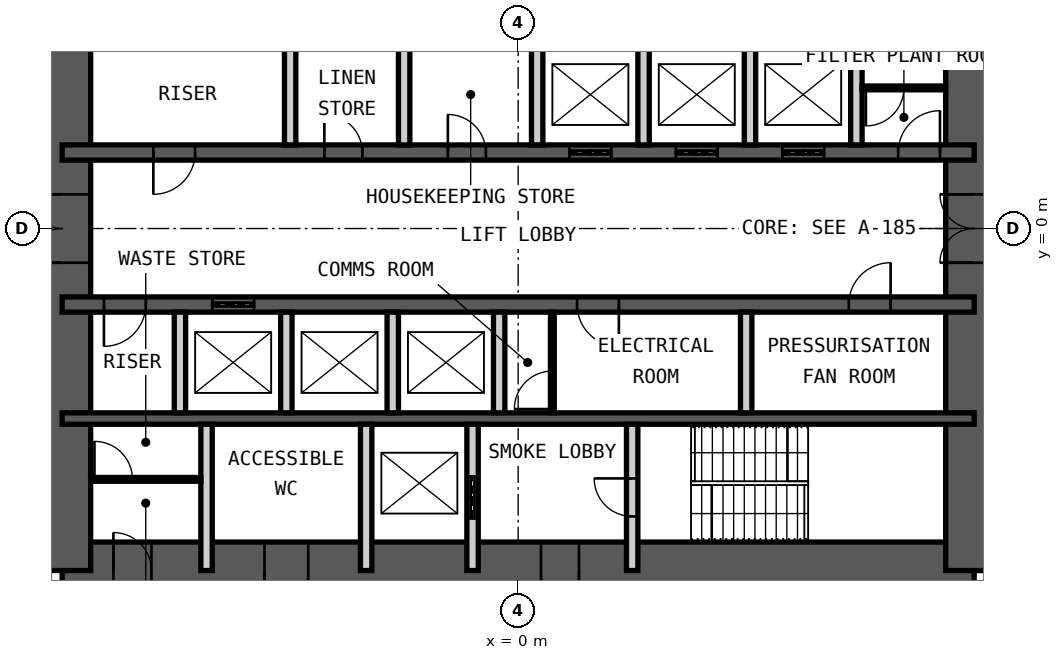
"""IFC4 building model, lengths in metres.
Left out: names, types, materials, properties, quantities, classifications, styles, units other than length and angle.
Written with IfcOpenShell. Run it as: python <this file> out.ifc"""

import sys

from ifc_helpers import new_model, si_unit, direction, frame, frame_2d, origin, place, context, subcontext, project, spatial, rectangle, extrude, element, fill, save


model = new_model("IFC4")
c1 = context("Model", 3, precision=1e-05, world=origin(), true_north=direction((0.0, 1.0)))
c2 = subcontext(c1, "Body", "Model", "MODEL_VIEW")
j1 = project(units=[si_unit("LENGTHUNIT", "METRE"), si_unit("PLANEANGLEUNIT", "RADIAN")], contexts=[c1])
p1 = place(None, origin())
s1 = spatial("IfcSite", under=j1, at=p1, CompositionType="ELEMENT")
p2 = place(p1, origin())
s2 = spatial("IfcBuilding", under=s1, at=p2, CompositionType="ELEMENT")
p3 = place(p2, frame((0.0, 0.0, 103.0)))
s3 = spatial("IfcBuildingStorey", under=s2, at=p3, CompositionType="ELEMENT", Elevation=103.0)
p4 = place(p3, frame((-12.0, -9.0, 0.0), z_axis=(0.0, 0.0, 1.0), x_axis=(1.0, 0.0, 0.0)))
e1 = element("IfcWall", 1, at=p4, inside=s3, PredefinedType="SHEAR", context=c2, shape_type="SweptSolid", body=[
    extrude(rectangle(XDim=24.0, YDim=1.5, at=frame_2d((12.0, 0.0))), origin(), (0.0, 0.0, 1.0), 4.2),
])
p5 = place(p4, frame((1.35, 0.0, 0.0)))
e2 = element("IfcOpeningElement", 2, at=p5, cuts=e1, PredefinedType="OPENING", context=c2, shape_type="SweptSolid", body=[
    extrude(rectangle(XDim=1.0, YDim=2.1, at=frame_2d((0.5, 1.05))), frame((0.0, 0.76, 0.0), z_axis=(0.0, -1.0, 0.0), x_axis=(1.0, 0.0, 0.0)), (0.0, 0.0, 1.0), 1.52),
])
p6 = place(p4, frame((5.325, 0.0, 0.0)))
e3 = element("IfcOpeningElement", 3, at=p6, cuts=e1, PredefinedType="OPENING", context=c2, shape_type="SweptSolid", body=[
    extrude(rectangle(XDim=1.15, YDim=2.1, at=frame_2d((0.575, 1.05))), frame((0.0, 0.76, 0.0), z_axis=(0.0, -1.0, 0.0), x_axis=(1.0, 0.0, 0.0)), (0.0, 0.0, 1.0), 1.52),
])
p7 = place(p4, frame((12.6, 0.0, 0.0)))
e4 = element("IfcOpeningElement", 4, at=p7, cuts=e1, PredefinedType="OPENING", context=c2, shape_type="SweptSolid", body=[
    extrude(rectangle(XDim=1.0, YDim=2.1, at=frame_2d((0.5, 1.05))), frame((0.0, 0.76, 0.0), z_axis=(0.0, -1.0, 0.0), x_axis=(1.0, 0.0, 0.0)), (0.0, 0.0, 1.0), 1.52),
])
p8 = place(p3, frame((12.0, -9.0, 0.0), z_axis=(0.0, 0.0, 1.0), x_axis=(0.0, 1.0, 0.0)))
e5 = element("IfcWall", 5, at=p8, inside=s3, PredefinedType="SHEAR", context=c2, shape_type="SweptSolid", body=[
    extrude(rectangle(XDim=18.0, YDim=1.5, at=frame_2d((9.0, 0.0))), origin(), (0.0, 0.0, 1.0), 4.2),
])
p9 = place(p8, frame((8.1, 0.0, 0.0)))
e6 = element("IfcOpeningElement", 6, at=p9, cuts=e5, PredefinedType="OPENING", context=c2, shape_type="SweptSolid", body=[
    extrude(rectangle(XDim=1.8, YDim=2.1, at=frame_2d((0.9, 1.05))), frame((0.0, 0.76, 0.0), z_axis=(0.0, -1.0, 0.0), x_axis=(1.0, 0.0, 0.0)), (0.0, 0.0, 1.0), 1.52),
])
p10 = place(p3, frame((-12.0, -9.0, 0.0), z_axis=(0.0, 0.0, 1.0), x_axis=(0.0, 1.0, 0.0)))
e7 = element("IfcWall", 7, at=p10, inside=s3, PredefinedType="SHEAR", context=c2, shape_type="SweptSolid", body=[
    extrude(rectangle(XDim=18.0, YDim=1.5, at=frame_2d((9.0, 0.0))), origin(), (0.0, 0.0, 1.0), 4.2),
])
p11 = place(p10, frame((8.1, 0.0, 0.0)))
e8 = element("IfcOpeningElement", 8, at=p11, cuts=e7, PredefinedType="OPENING", context=c2, shape_type="SweptSolid", body=[
    extrude(rectangle(XDim=1.8, YDim=2.1, at=frame_2d((0.9, 1.05))), frame((0.0, 0.76, 0.0), z_axis=(0.0, -1.0, 0.0), x_axis=(1.0, 0.0, 0.0)), (0.0, 0.0, 1.0), 1.52),
])
p12 = place(p3, frame((-12.0, 2.0, 0.0), z_axis=(0.0, 0.0, 1.0), x_axis=(1.0, 0.0, 0.0)))
e9 = element("IfcWall", 9, at=p12, inside=s3, PredefinedType="SHEAR", context=c2, shape_type="SweptSolid", body=[
    extrude(rectangle(XDim=24.0, YDim=0.4, at=frame_2d((12.0, 0.0))), origin(), (0.0, 0.0, 1.0), 4.2),
])
p13 = place(p12, frame((2.4, 0.0, 0.0)))
e10 = element("IfcOpeningElement", 10, at=p13, cuts=e9, PredefinedType="OPENING", context=c2, shape_type="SweptSolid", body=[
    extrude(rectangle(XDim=1.1, YDim=2.1, at=frame_2d((0.55, 1.05))), frame((0.0, 0.21, 0.0), z_axis=(0.0, -1.0, 0.0), x_axis=(1.0, 0.0, 0.0)), (0.0, 0.0, 1.0), 0.42),
])
p14 = place(p12, frame((22.0, 0.0, 0.0)))
e11 = element("IfcOpeningElement", 11, at=p14, cuts=e9, PredefinedType="OPENING", context=c2, shape_type="SweptSolid", body=[
    extrude(rectangle(XDim=1.1, YDim=2.1, at=frame_2d((0.55, 1.05))), frame((0.0, 0.21, 0.0), z_axis=(0.0, -1.0, 0.0), x_axis=(1.0, 0.0, 0.0)), (0.0, 0.0, 1.0), 0.42),
])
p15 = place(p12, frame((10.15, 0.0, 0.0)))
e12 = element("IfcOpeningElement", 12, at=p15, cuts=e9, PredefinedType="OPENING", context=c2, shape_type="SweptSolid", body=[
    extrude(rectangle(XDim=1.0, YDim=2.1, at=frame_2d((0.5, 1.05))), frame((0.0, 0.21, 0.0), z_axis=(0.0, -1.0, 0.0), x_axis=(1.0, 0.0, 0.0)), (0.0, 0.0, 1.0), 0.42),
])
p16 = place(p12, frame((6.9, 0.0, 0.0)))
e13 = element("IfcOpeningElement", 13, at=p16, cuts=e9, PredefinedType="OPENING", context=c2, shape_type="SweptSolid", body=[
    extrude(rectangle(XDim=1.0, YDim=2.1, at=frame_2d((0.5, 1.05))), frame((0.0, 0.21, 0.0), z_axis=(0.0, -1.0, 0.0), x_axis=(1.0, 0.0, 0.0)), (0.0, 0.0, 1.0), 0.42),
])
p17 = place(p12, frame((13.35, 0.0, 0.0)))
e14 = element("IfcOpeningElement", 14, at=p17, cuts=e9, PredefinedType="OPENING", context=c2, shape_type="SweptSolid", body=[
    extrude(rectangle(XDim=1.1, YDim=2.4, at=frame_2d((0.55, 1.2))), frame((0.0, 0.21, 0.0), z_axis=(0.0, -1.0, 0.0), x_axis=(1.0, 0.0, 0.0)), (0.0, 0.0, 1.0), 0.42),
])
p18 = place(p12, frame((16.15, 0.0, 0.0)))
e15 = element("IfcOpeningElement", 15, at=p18, cuts=e9, PredefinedType="OPENING", context=c2, shape_type="SweptSolid", body=[
    extrude(rectangle(XDim=1.1, YDim=2.4, at=frame_2d((0.55, 1.2))), frame((0.0, 0.21, 0.0), z_axis=(0.0, -1.0, 0.0), x_axis=(1.0, 0.0, 0.0)), (0.0, 0.0, 1.0), 0.42),
])
p19 = place(p12, frame((18.95, 0.0, 0.0)))
e16 = element("IfcOpeningElement", 16, at=p19, cuts=e9, PredefinedType="OPENING", context=c2, shape_type="SweptSolid", body=[
    extrude(rectangle(XDim=1.1, YDim=2.4, at=frame_2d((0.55, 1.2))), frame((0.0, 0.21, 0.0), z_axis=(0.0, -1.0, 0.0), x_axis=(1.0, 0.0, 0.0)), (0.0, 0.0, 1.0), 0.42),
])
p20 = place(p3, frame((-12.0, -2.0, 0.0), z_axis=(0.0, 0.0, 1.0), x_axis=(1.0, 0.0, 0.0)))
e17 = element("IfcWall", 17, at=p20, inside=s3, PredefinedType="SHEAR", context=c2, shape_type="SweptSolid", body=[
    extrude(rectangle(XDim=24.0, YDim=0.4, at=frame_2d((12.0, 0.0))), origin(), (0.0, 0.0, 1.0), 4.2),
])
p21 = place(p20, frame((1.1, 0.0, 0.0)))
e18 = element("IfcOpeningElement", 18, at=p21, cuts=e17, PredefinedType="OPENING", context=c2, shape_type="SweptSolid", body=[
    extrude(rectangle(XDim=1.1, YDim=2.1, at=frame_2d((0.55, 1.05))), frame((0.0, 0.21, 0.0), z_axis=(0.0, -1.0, 0.0), x_axis=(1.0, 0.0, 0.0)), (0.0, 0.0, 1.0), 0.42),
])
p22 = place(p20, frame((13.55, 0.0, 0.0)))
e19 = element("IfcOpeningElement", 19, at=p22, cuts=e17, PredefinedType="OPENING", context=c2, shape_type="SweptSolid", body=[
    extrude(rectangle(XDim=1.1, YDim=2.1, at=frame_2d((0.55, 1.05))), frame((0.0, 0.21, 0.0), z_axis=(0.0, -1.0, 0.0), x_axis=(1.0, 0.0, 0.0)), (0.0, 0.0, 1.0), 0.42),
])
p23 = place(p20, frame((20.7, 0.0, 0.0)))
e20 = element("IfcOpeningElement", 20, at=p23, cuts=e17, PredefinedType="OPENING", context=c2, shape_type="SweptSolid", body=[
    extrude(rectangle(XDim=1.1, YDim=2.1, at=frame_2d((0.55, 1.05))), frame((0.0, 0.21, 0.0), z_axis=(0.0, -1.0, 0.0), x_axis=(1.0, 0.0, 0.0)), (0.0, 0.0, 1.0), 0.42),
])
p24 = place(p20, frame((3.95, 0.0, 0.0)))
e21 = element("IfcOpeningElement", 21, at=p24, cuts=e17, PredefinedType="OPENING", context=c2, shape_type="SweptSolid", body=[
    extrude(rectangle(XDim=1.1, YDim=2.4, at=frame_2d((0.55, 1.2))), frame((0.0, 0.21, 0.0), z_axis=(0.0, -1.0, 0.0), x_axis=(1.0, 0.0, 0.0)), (0.0, 0.0, 1.0), 0.42),
])
p25 = place(p3, frame((-12.0, -5.0, 0.0), z_axis=(0.0, 0.0, 1.0), x_axis=(1.0, 0.0, 0.0)))
e22 = element("IfcWall", 22, at=p25, inside=s3, PredefinedType="SHEAR", context=c2, shape_type="SweptSolid", body=[
    extrude(rectangle(XDim=24.0, YDim=0.3, at=frame_2d((12.0, 0.0))), origin(), (0.0, 0.0, 1.0), 4.2),
])
for number, where, z_axis, x_axis in (
    (23, (-6.0, 2.2, 0.0), (0.0, 0.0, 1.0), (0.0, 1.0, 0.0)),
    (24, (-3.0, 2.2, 0.0), (0.0, 0.0, 1.0), (0.0, 1.0, 0.0)),
    (25, (0.5, 2.2, 0.0), (0.0, 0.0, 1.0), (0.0, 1.0, 0.0)),
    (26, (3.3, 2.2, 0.0), (0.0, 0.0, 1.0), (0.0, 1.0, 0.0)),
    (27, (6.1, 2.2, 0.0), (0.0, 0.0, 1.0), (0.0, 1.0, 0.0)),
    (28, (8.9, 2.2, 0.0), (0.0, 0.0, 1.0), (0.0, 1.0, 0.0)),
    (29, (-8.9, -4.85, 0.0), (0.0, 0.0, 1.0), (0.0, 1.0, 0.0)),
    (30, (-6.1, -4.85, 0.0), (0.0, 0.0, 1.0), (0.0, 1.0, 0.0)),
    (31, (-3.3, -4.85, 0.0), (0.0, 0.0, 1.0), (0.0, 1.0, 0.0)),
    (32, (-0.5, -4.85, 0.0), (0.0, 0.0, 1.0), (0.0, 1.0, 0.0)),
    (33, (6.0, -4.85, 0.0), (0.0, 0.0, 1.0), (0.0, 1.0, 0.0)),
):
    element("IfcWall", number, at=place(p3, frame(where, z_axis=z_axis, x_axis=x_axis)), inside=s3, PredefinedType="PARTITIONING", context=c2, shape_type="SweptSolid", body=[
        extrude(rectangle(XDim=2.65, YDim=0.3, at=frame_2d((1.325, 0.0))), origin(), (0.0, 0.0, 1.0), 3.98),
    ])
for number, where, z_axis, x_axis in (
    (34, (-8.2, -9.0, 0.0), (0.0, 0.0, 1.0), (0.0, 1.0, 0.0)),
    (35, (-4.0, -9.0, 0.0), (0.0, 0.0, 1.0), (0.0, 1.0, 0.0)),
):
    element("IfcWall", number, at=place(p3, frame(where, z_axis=z_axis, x_axis=x_axis)), inside=s3, PredefinedType="PARTITIONING", context=c2, shape_type="SweptSolid", body=[
        extrude(rectangle(XDim=3.85, YDim=0.3, at=frame_2d((1.925, 0.0))), origin(), (0.0, 0.0, 1.0), 3.98),
    ])
p26 = place(p3, frame((-1.2, -9.0, 0.0), z_axis=(0.0, 0.0, 1.0), x_axis=(0.0, 1.0, 0.0)))
e36 = element("IfcWall", 36, at=p26, inside=s3, PredefinedType="PARTITIONING", context=c2, shape_type="SweptSolid", body=[
    extrude(rectangle(XDim=3.85, YDim=0.3, at=frame_2d((1.925, 0.0))), origin(), (0.0, 0.0, 1.0), 3.98),
])
p27 = place(p26, frame((1.375, 0.0, 0.0)))
e37 = element("IfcOpeningElement", 37, at=p27, cuts=e36, PredefinedType="OPENING", context=c2, shape_type="SweptSolid", body=[
    extrude(rectangle(XDim=1.1, YDim=2.4, at=frame_2d((0.55, 1.2))), frame((0.0, 0.16, 0.0), z_axis=(0.0, -1.0, 0.0), x_axis=(1.0, 0.0, 0.0)), (0.0, 0.0, 1.0), 0.32),
])
p28 = place(p3, frame((3.0, -9.0, 0.0), z_axis=(0.0, 0.0, 1.0), x_axis=(0.0, 1.0, 0.0)))
e38 = element("IfcWall", 38, at=p28, inside=s3, PredefinedType="PARTITIONING", context=c2, shape_type="SweptSolid", body=[
    extrude(rectangle(XDim=3.85, YDim=0.3, at=frame_2d((1.925, 0.0))), origin(), (0.0, 0.0, 1.0), 3.98),
])
p29 = place(p28, frame((1.425, 0.0, 0.0)))
e39 = element("IfcOpeningElement", 39, at=p29, cuts=e38, PredefinedType="OPENING", context=c2, shape_type="SweptSolid", body=[
    extrude(rectangle(XDim=1.0, YDim=2.1, at=frame_2d((0.5, 1.05))), frame((0.0, 0.16, 0.0), z_axis=(0.0, -1.0, 0.0), x_axis=(1.0, 0.0, 0.0)), (0.0, 0.0, 1.0), 0.32),
])
p30 = place(p3, frame((0.9, -4.85, 0.0), z_axis=(0.0, 0.0, 1.0), x_axis=(0.0, 1.0, 0.0)))
e40 = element("IfcWall", 40, at=p30, inside=s3, PredefinedType="PARTITIONING", context=c2, shape_type="SweptSolid", body=[
    extrude(rectangle(XDim=2.65, YDim=0.1, at=frame_2d((1.325, 0.0))), origin(), (0.0, 0.0, 1.0), 3.98),
])
p31 = place(p30, frame((0.1, 0.0, 0.0)))
e41 = element("IfcOpeningElement", 41, at=p31, cuts=e40, PredefinedType="OPENING", context=c2, shape_type="SweptSolid", body=[
    extrude(rectangle(XDim=1.0, YDim=2.4, at=frame_2d((0.5, 1.2))), frame((0.0, 0.06, 0.0), z_axis=(0.0, -1.0, 0.0), x_axis=(1.0, 0.0, 0.0)), (0.0, 0.0, 1.0), 0.12),
])
p32 = place(p3, frame((-11.25, -6.6, 0.0), z_axis=(0.0, 0.0, 1.0), x_axis=(1.0, 0.0, 0.0)))
e42 = element("IfcWall", 42, at=p32, inside=s3, PredefinedType="PARTITIONING", context=c2, shape_type="SweptSolid", body=[
    extrude(rectangle(XDim=2.9, YDim=0.1, at=frame_2d((1.45, 0.0))), origin(), (0.0, 0.0, 1.0), 3.98),
])
p33 = place(p32, frame((0.1, 0.0, 0.0)))
e43 = element("IfcOpeningElement", 43, at=p33, cuts=e42, PredefinedType="OPENING", context=c2, shape_type="SweptSolid", body=[
    extrude(rectangle(XDim=1.0, YDim=2.4, at=frame_2d((0.5, 1.2))), frame((0.0, 0.06, 0.0), z_axis=(0.0, -1.0, 0.0), x_axis=(1.0, 0.0, 0.0)), (0.0, 0.0, 1.0), 0.12),
])
p34 = place(p3, frame((9.05, 3.7, 0.0), z_axis=(0.0, 0.0, 1.0), x_axis=(1.0, 0.0, 0.0)))
e44 = element("IfcWall", 44, at=p34, inside=s3, PredefinedType="PARTITIONING", context=c2, shape_type="SweptSolid", body=[
    extrude(rectangle(XDim=2.2, YDim=0.1, at=frame_2d((1.1, 0.0))), origin(), (0.0, 0.0, 1.0), 3.98),
])
p35 = place(p34, frame((0.1, 0.0, 0.0)))
e45 = element("IfcOpeningElement", 45, at=p35, cuts=e44, PredefinedType="OPENING", context=c2, shape_type="SweptSolid", body=[
    extrude(rectangle(XDim=1.0, YDim=2.4, at=frame_2d((0.5, 1.2))), frame((0.0, 0.06, 0.0), z_axis=(0.0, -1.0, 0.0), x_axis=(1.0, 0.0, 0.0)), (0.0, 0.0, 1.0), 0.12),
])
p36 = place(p5, origin())
e46 = element("IfcDoor", 46, at=p36, inside=s3, OperationType="SINGLE_SWING_RIGHT", PredefinedType="DOOR", context=c2, shape_type="SweptSolid", body=[
    extrude(rectangle(XDim=1.0, YDim=2.1, at=frame_2d((0.5, 1.05))), frame((0.0, 0.025, 0.0), z_axis=(0.0, -1.0, 0.0), x_axis=(1.0, 0.0, 0.0)), (0.0, 0.0, 1.0), 0.05),
])
fill(e2, e46)
p37 = place(p6, origin())
e47 = element("IfcDoor", 47, at=p37, inside=s3, OperationType="SINGLE_SWING_LEFT", PredefinedType="DOOR", context=c2, shape_type="SweptSolid", body=[
    extrude(rectangle(XDim=1.15, YDim=2.1, at=frame_2d((0.575, 1.05))), frame((0.0, 0.025, 0.0), z_axis=(0.0, -1.0, 0.0), x_axis=(1.0, 0.0, 0.0)), (0.0, 0.0, 1.0), 0.05),
])
fill(e3, e47)
p38 = place(p7, origin())
e48 = element("IfcDoor", 48, at=p38, inside=s3, OperationType="SINGLE_SWING_RIGHT", PredefinedType="DOOR", context=c2, shape_type="SweptSolid", body=[
    extrude(rectangle(XDim=1.0, YDim=2.1, at=frame_2d((0.5, 1.05))), frame((0.0, 0.025, 0.0), z_axis=(0.0, -1.0, 0.0), x_axis=(1.0, 0.0, 0.0)), (0.0, 0.0, 1.0), 0.05),
])
fill(e4, e48)
p39 = place(p29, origin())
e49 = element("IfcDoor", 49, at=p39, inside=s3, OperationType="SINGLE_SWING_LEFT", PredefinedType="DOOR", context=c2, shape_type="SweptSolid", body=[
    extrude(rectangle(XDim=1.0, YDim=2.1, at=frame_2d((0.5, 1.05))), frame((0.0, 0.025, 0.0), z_axis=(0.0, -1.0, 0.0), x_axis=(1.0, 0.0, 0.0)), (0.0, 0.0, 1.0), 0.05),
])
fill(e39, e49)
p40 = place(p13, origin())
e50 = element("IfcDoor", 50, at=p40, inside=s3, OperationType="SINGLE_SWING_LEFT", PredefinedType="DOOR", context=c2, shape_type="SweptSolid", body=[
    extrude(rectangle(XDim=1.1, YDim=2.1, at=frame_2d((0.55, 1.05))), frame((0.0, 0.025, 0.0), z_axis=(0.0, -1.0, 0.0), x_axis=(1.0, 0.0, 0.0)), (0.0, 0.0, 1.0), 0.05),
])
fill(e10, e50)
p41 = place(p21, origin())
e51 = element("IfcDoor", 51, at=p41, inside=s3, OperationType="SINGLE_SWING_LEFT", PredefinedType="DOOR", context=c2, shape_type="SweptSolid", body=[
    extrude(rectangle(XDim=1.1, YDim=2.1, at=frame_2d((0.55, 1.05))), frame((0.0, 0.025, 0.0), z_axis=(0.0, -1.0, 0.0), x_axis=(1.0, 0.0, 0.0)), (0.0, 0.0, 1.0), 0.05),
])
fill(e18, e51)
p42 = place(p14, origin())
e52 = element("IfcDoor", 52, at=p42, inside=s3, OperationType="SINGLE_SWING_LEFT", PredefinedType="DOOR", context=c2, shape_type="SweptSolid", body=[
    extrude(rectangle(XDim=1.1, YDim=2.1, at=frame_2d((0.55, 1.05))), frame((0.0, 0.025, 0.0), z_axis=(0.0, -1.0, 0.0), x_axis=(1.0, 0.0, 0.0)), (0.0, 0.0, 1.0), 0.05),
])
fill(e11, e52)
p43 = place(p15, origin())
e53 = element("IfcDoor", 53, at=p43, inside=s3, OperationType="SINGLE_SWING_RIGHT", PredefinedType="DOOR", context=c2, shape_type="SweptSolid", body=[
    extrude(rectangle(XDim=1.0, YDim=2.1, at=frame_2d((0.5, 1.05))), frame((0.0, 0.025, 0.0), z_axis=(0.0, -1.0, 0.0), x_axis=(1.0, 0.0, 0.0)), (0.0, 0.0, 1.0), 0.05),
])
fill(e12, e53)
p44 = place(p22, origin())
e54 = element("IfcDoor", 54, at=p44, inside=s3, OperationType="SINGLE_SWING_RIGHT", PredefinedType="DOOR", context=c2, shape_type="SweptSolid", body=[
    extrude(rectangle(XDim=1.1, YDim=2.1, at=frame_2d((0.55, 1.05))), frame((0.0, 0.025, 0.0), z_axis=(0.0, -1.0, 0.0), x_axis=(1.0, 0.0, 0.0)), (0.0, 0.0, 1.0), 0.05),
])
fill(e19, e54)
p45 = place(p23, origin())
e55 = element("IfcDoor", 55, at=p45, inside=s3, OperationType="SINGLE_SWING_LEFT", PredefinedType="DOOR", context=c2, shape_type="SweptSolid", body=[
    extrude(rectangle(XDim=1.1, YDim=2.1, at=frame_2d((0.55, 1.05))), frame((0.0, 0.025, 0.0), z_axis=(0.0, -1.0, 0.0), x_axis=(1.0, 0.0, 0.0)), (0.0, 0.0, 1.0), 0.05),
])
fill(e20, e55)
p46 = place(p9, origin())
e56 = element("IfcDoor", 56, at=p46, inside=s3, OperationType="DOUBLE_DOOR_DOUBLE_SWING", PredefinedType="DOOR", context=c2, shape_type="SweptSolid", body=[
    extrude(rectangle(XDim=1.8, YDim=2.1, at=frame_2d((0.9, 1.05))), frame((0.0, 0.025, 0.0), z_axis=(0.0, -1.0, 0.0), x_axis=(1.0, 0.0, 0.0)), (0.0, 0.0, 1.0), 0.05),
])
fill(e6, e56)
p47 = place(p11, origin())
e57 = element("IfcDoor", 57, at=p47, inside=s3, OperationType="DOUBLE_DOOR_DOUBLE_SWING", PredefinedType="DOOR", context=c2, shape_type="SweptSolid", body=[
    extrude(rectangle(XDim=1.8, YDim=2.1, at=frame_2d((0.9, 1.05))), frame((0.0, 0.025, 0.0), z_axis=(0.0, -1.0, 0.0), x_axis=(1.0, 0.0, 0.0)), (0.0, 0.0, 1.0), 0.05),
])
fill(e8, e57)
p48 = place(p27, origin())
e58 = element("IfcDoor", 58, at=p48, inside=s3, OperationType="DOUBLE_DOOR_SLIDING", PredefinedType="DOOR", context=c2, shape_type="SweptSolid", body=[
    extrude(rectangle(XDim=1.1, YDim=2.4, at=frame_2d((0.55, 1.2))), frame((0.0, 0.025, 0.0), z_axis=(0.0, -1.0, 0.0), x_axis=(1.0, 0.0, 0.0)), (0.0, 0.0, 1.0), 0.05),
])
fill(e37, e58)
p49 = place(p16, origin())
e59 = element("IfcDoor", 59, at=p49, inside=s3, OperationType="SINGLE_SWING_RIGHT", PredefinedType="DOOR", context=c2, shape_type="SweptSolid", body=[
    extrude(rectangle(XDim=1.0, YDim=2.1, at=frame_2d((0.5, 1.05))), frame((0.0, 0.025, 0.0), z_axis=(0.0, -1.0, 0.0), x_axis=(1.0, 0.0, 0.0)), (0.0, 0.0, 1.0), 0.05),
])
fill(e13, e59)
p50 = place(p17, origin())
e60 = element("IfcDoor", 60, at=p50, inside=s3, OperationType="DOUBLE_DOOR_SLIDING", PredefinedType="DOOR", context=c2, shape_type="SweptSolid", body=[
    extrude(rectangle(XDim=1.1, YDim=2.4, at=frame_2d((0.55, 1.2))), frame((0.0, 0.025, 0.0), z_axis=(0.0, -1.0, 0.0), x_axis=(1.0, 0.0, 0.0)), (0.0, 0.0, 1.0), 0.05),
])
fill(e14, e60)
p51 = place(p18, origin())
e61 = element("IfcDoor", 61, at=p51, inside=s3, OperationType="DOUBLE_DOOR_SLIDING", PredefinedType="DOOR", context=c2, shape_type="SweptSolid", body=[
    extrude(rectangle(XDim=1.1, YDim=2.4, at=frame_2d((0.55, 1.2))), frame((0.0, 0.025, 0.0), z_axis=(0.0, -1.0, 0.0), x_axis=(1.0, 0.0, 0.0)), (0.0, 0.0, 1.0), 0.05),
])
fill(e15, e61)
p52 = place(p19, origin())
e62 = element("IfcDoor", 62, at=p52, inside=s3, OperationType="DOUBLE_DOOR_SLIDING", PredefinedType="DOOR", context=c2, shape_type="SweptSolid", body=[
    extrude(rectangle(XDim=1.1, YDim=2.4, at=frame_2d((0.55, 1.2))), frame((0.0, 0.025, 0.0), z_axis=(0.0, -1.0, 0.0), x_axis=(1.0, 0.0, 0.0)), (0.0, 0.0, 1.0), 0.05),
])
fill(e16, e62)
p53 = place(p24, origin())
e63 = element("IfcDoor", 63, at=p53, inside=s3, OperationType="DOUBLE_DOOR_SLIDING", PredefinedType="DOOR", context=c2, shape_type="SweptSolid", body=[
    extrude(rectangle(XDim=1.1, YDim=2.4, at=frame_2d((0.55, 1.2))), frame((0.0, 0.025, 0.0), z_axis=(0.0, -1.0, 0.0), x_axis=(1.0, 0.0, 0.0)), (0.0, 0.0, 1.0), 0.05),
])
fill(e21, e63)
p54 = place(p31, origin())
e64 = element("IfcDoor", 64, at=p54, inside=s3, OperationType="SINGLE_SWING_RIGHT", PredefinedType="DOOR", context=c2, shape_type="SweptSolid", body=[
    extrude(rectangle(XDim=1.0, YDim=2.4, at=frame_2d((0.5, 1.2))), frame((0.0, 0.025, 0.0), z_axis=(0.0, -1.0, 0.0), x_axis=(1.0, 0.0, 0.0)), (0.0, 0.0, 1.0), 0.05),
])
fill(e41, e64)
p55 = place(p33, origin())
e65 = element("IfcDoor", 65, at=p55, inside=s3, OperationType="SINGLE_SWING_RIGHT", PredefinedType="DOOR", context=c2, shape_type="SweptSolid", body=[
    extrude(rectangle(XDim=1.0, YDim=2.4, at=frame_2d((0.5, 1.2))), frame((0.0, 0.025, 0.0), z_axis=(0.0, -1.0, 0.0), x_axis=(1.0, 0.0, 0.0)), (0.0, 0.0, 1.0), 0.05),
])
fill(e43, e65)
p56 = place(p35, origin())
e66 = element("IfcDoor", 66, at=p56, inside=s3, OperationType="SINGLE_SWING_LEFT", PredefinedType="DOOR", context=c2, shape_type="SweptSolid", body=[
    extrude(rectangle(XDim=1.0, YDim=2.4, at=frame_2d((0.5, 1.2))), frame((0.0, 0.025, 0.0), z_axis=(0.0, -1.0, 0.0), x_axis=(1.0, 0.0, 0.0)), (0.0, 0.0, 1.0), 0.05),
])
fill(e45, e66)
save(model, sys.argv[1])
